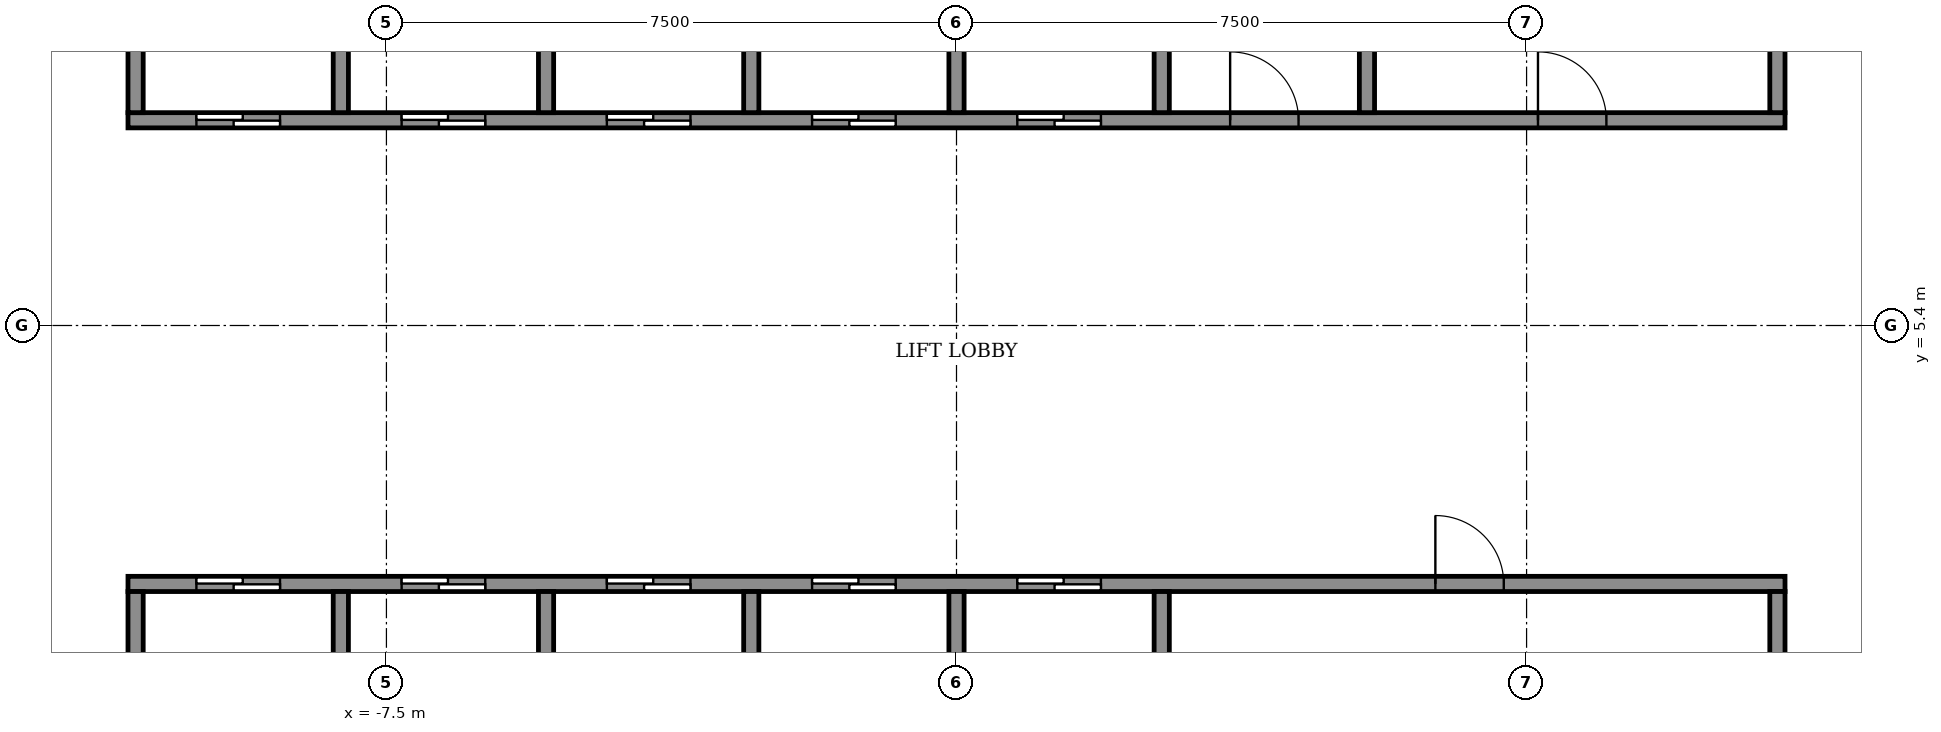
"""IFC4 building model, lengths in metres.
Left out: names, types, materials, properties, quantities, classifications, styles, units other than length and angle.
Written with IfcOpenShell. Run it as: python <this file> out.ifc"""

import sys

from ifc_helpers import new_model, si_unit, direction, frame, frame_2d, origin, place, context, subcontext, project, spatial, rectangle, extrude, element, fill, save


model = new_model("IFC4")
c1 = context("Model", 3, precision=1e-05, world=origin(), true_north=direction((0.0, 1.0)))
c2 = subcontext(c1, "Body", "Model", "MODEL_VIEW")
j1 = project(units=[si_unit("LENGTHUNIT", "METRE"), si_unit("PLANEANGLEUNIT", "RADIAN")], contexts=[c1])
p1 = place(None, origin())
s1 = spatial("IfcSite", under=j1, at=p1, CompositionType="ELEMENT")
p2 = place(p1, origin())
s2 = spatial("IfcBuilding", under=s1, at=p2, CompositionType="ELEMENT")
p3 = place(p2, frame((0.0, 0.0, 109.1)))
s3 = spatial("IfcBuildingStorey", under=s2, at=p3, CompositionType="ELEMENT", Elevation=109.1)
p4 = place(p3, frame((-10.9, 2.0, 0.0), z_axis=(0.0, 0.0, 1.0), x_axis=(1.0, 0.0, 0.0)))
e1 = element("IfcWall", 1, at=p4, inside=s3, PredefinedType="SHEAR", context=c2, shape_type="SweptSolid", body=[
    extrude(rectangle(XDim=21.8, YDim=0.2, at=frame_2d((10.9, 0.0))), origin(), (0.0, 0.0, 1.0), 3.05),
])
p5 = place(p4, frame((0.9, 0.0, 0.0)))
e2 = element("IfcOpeningElement", 2, at=p5, cuts=e1, PredefinedType="OPENING", context=c2, shape_type="SweptSolid", body=[
    extrude(rectangle(XDim=1.1, YDim=2.1, at=frame_2d((0.55, 1.05))), frame((0.0, 0.11, 0.0), z_axis=(0.0, -1.0, 0.0), x_axis=(1.0, 0.0, 0.0)), (0.0, 0.0, 1.0), 0.22),
])
p6 = place(p4, frame((3.6, 0.0, 0.0)))
e3 = element("IfcOpeningElement", 3, at=p6, cuts=e1, PredefinedType="OPENING", context=c2, shape_type="SweptSolid", body=[
    extrude(rectangle(XDim=1.1, YDim=2.1, at=frame_2d((0.55, 1.05))), frame((0.0, 0.11, 0.0), z_axis=(0.0, -1.0, 0.0), x_axis=(1.0, 0.0, 0.0)), (0.0, 0.0, 1.0), 0.22),
])
p7 = place(p4, frame((6.3, 0.0, 0.0)))
e4 = element("IfcOpeningElement", 4, at=p7, cuts=e1, PredefinedType="OPENING", context=c2, shape_type="SweptSolid", body=[
    extrude(rectangle(XDim=1.1, YDim=2.1, at=frame_2d((0.55, 1.05))), frame((0.0, 0.11, 0.0), z_axis=(0.0, -1.0, 0.0), x_axis=(1.0, 0.0, 0.0)), (0.0, 0.0, 1.0), 0.22),
])
p8 = place(p4, frame((9.0, 0.0, 0.0)))
e5 = element("IfcOpeningElement", 5, at=p8, cuts=e1, PredefinedType="OPENING", context=c2, shape_type="SweptSolid", body=[
    extrude(rectangle(XDim=1.1, YDim=2.1, at=frame_2d((0.55, 1.05))), frame((0.0, 0.11, 0.0), z_axis=(0.0, -1.0, 0.0), x_axis=(1.0, 0.0, 0.0)), (0.0, 0.0, 1.0), 0.22),
])
p9 = place(p4, frame((11.7, 0.0, 0.0)))
e6 = element("IfcOpeningElement", 6, at=p9, cuts=e1, PredefinedType="OPENING", context=c2, shape_type="SweptSolid", body=[
    extrude(rectangle(XDim=1.1, YDim=2.1, at=frame_2d((0.55, 1.05))), frame((0.0, 0.11, 0.0), z_axis=(0.0, -1.0, 0.0), x_axis=(1.0, 0.0, 0.0)), (0.0, 0.0, 1.0), 0.22),
])
p10 = place(p4, frame((17.2, 0.0, 0.0)))
e7 = element("IfcOpeningElement", 7, at=p10, cuts=e1, PredefinedType="OPENING", context=c2, shape_type="SweptSolid", body=[
    extrude(rectangle(XDim=0.9, YDim=2.1, at=frame_2d((0.45, 1.05))), frame((0.0, 0.11, 0.0), z_axis=(0.0, -1.0, 0.0), x_axis=(1.0, 0.0, 0.0)), (0.0, 0.0, 1.0), 0.22),
])
p11 = place(p3, frame((-10.9, 8.1, 0.0), z_axis=(0.0, 0.0, 1.0), x_axis=(1.0, 0.0, 0.0)))
e8 = element("IfcWall", 8, at=p11, inside=s3, PredefinedType="SHEAR", context=c2, shape_type="SweptSolid", body=[
    extrude(rectangle(XDim=21.8, YDim=0.2, at=frame_2d((10.9, 0.0))), origin(), (0.0, 0.0, 1.0), 3.05),
])
p12 = place(p11, frame((0.9, 0.0, 0.0)))
e9 = element("IfcOpeningElement", 9, at=p12, cuts=e8, PredefinedType="OPENING", context=c2, shape_type="SweptSolid", body=[
    extrude(rectangle(XDim=1.1, YDim=2.1, at=frame_2d((0.55, 1.05))), frame((0.0, 0.11, 0.0), z_axis=(0.0, -1.0, 0.0), x_axis=(1.0, 0.0, 0.0)), (0.0, 0.0, 1.0), 0.22),
])
p13 = place(p11, frame((3.6, 0.0, 0.0)))
e10 = element("IfcOpeningElement", 10, at=p13, cuts=e8, PredefinedType="OPENING", context=c2, shape_type="SweptSolid", body=[
    extrude(rectangle(XDim=1.1, YDim=2.1, at=frame_2d((0.55, 1.05))), frame((0.0, 0.11, 0.0), z_axis=(0.0, -1.0, 0.0), x_axis=(1.0, 0.0, 0.0)), (0.0, 0.0, 1.0), 0.22),
])
p14 = place(p11, frame((6.3, 0.0, 0.0)))
e11 = element("IfcOpeningElement", 11, at=p14, cuts=e8, PredefinedType="OPENING", context=c2, shape_type="SweptSolid", body=[
    extrude(rectangle(XDim=1.1, YDim=2.1, at=frame_2d((0.55, 1.05))), frame((0.0, 0.11, 0.0), z_axis=(0.0, -1.0, 0.0), x_axis=(1.0, 0.0, 0.0)), (0.0, 0.0, 1.0), 0.22),
])
p15 = place(p11, frame((9.0, 0.0, 0.0)))
e12 = element("IfcOpeningElement", 12, at=p15, cuts=e8, PredefinedType="OPENING", context=c2, shape_type="SweptSolid", body=[
    extrude(rectangle(XDim=1.1, YDim=2.1, at=frame_2d((0.55, 1.05))), frame((0.0, 0.11, 0.0), z_axis=(0.0, -1.0, 0.0), x_axis=(1.0, 0.0, 0.0)), (0.0, 0.0, 1.0), 0.22),
])
p16 = place(p11, frame((11.7, 0.0, 0.0)))
e13 = element("IfcOpeningElement", 13, at=p16, cuts=e8, PredefinedType="OPENING", context=c2, shape_type="SweptSolid", body=[
    extrude(rectangle(XDim=1.1, YDim=2.1, at=frame_2d((0.55, 1.05))), frame((0.0, 0.11, 0.0), z_axis=(0.0, -1.0, 0.0), x_axis=(1.0, 0.0, 0.0)), (0.0, 0.0, 1.0), 0.22),
])
p17 = place(p11, frame((14.5, 0.0, 0.0)))
e14 = element("IfcOpeningElement", 14, at=p17, cuts=e8, PredefinedType="OPENING", context=c2, shape_type="SweptSolid", body=[
    extrude(rectangle(XDim=0.9, YDim=2.1, at=frame_2d((0.45, 1.05))), frame((0.0, 0.11, 0.0), z_axis=(0.0, -1.0, 0.0), x_axis=(1.0, 0.0, 0.0)), (0.0, 0.0, 1.0), 0.22),
])
p18 = place(p11, frame((18.55, 0.0, 0.0)))
e15 = element("IfcOpeningElement", 15, at=p18, cuts=e8, PredefinedType="OPENING", context=c2, shape_type="SweptSolid", body=[
    extrude(rectangle(XDim=0.9, YDim=2.1, at=frame_2d((0.45, 1.05))), frame((0.0, 0.11, 0.0), z_axis=(0.0, -1.0, 0.0), x_axis=(1.0, 0.0, 0.0)), (0.0, 0.0, 1.0), 0.22),
])
for number, where, z_axis, x_axis in (
    (16, (-10.8, -0.6, 0.0), (0.0, 0.0, 1.0), (0.0, 1.0, 0.0)),
    (17, (-8.1, -0.6, 0.0), (0.0, 0.0, 1.0), (0.0, 1.0, 0.0)),
    (18, (-5.4, -0.6, 0.0), (0.0, 0.0, 1.0), (0.0, 1.0, 0.0)),
    (19, (-2.7, -0.6, 0.0), (0.0, 0.0, 1.0), (0.0, 1.0, 0.0)),
    (20, (0.0, -0.6, 0.0), (0.0, 0.0, 1.0), (0.0, 1.0, 0.0)),
    (21, (2.7, -0.6, 0.0), (0.0, 0.0, 1.0), (0.0, 1.0, 0.0)),
):
    element("IfcWall", number, at=place(p3, frame(where, z_axis=z_axis, x_axis=x_axis)), inside=s3, PredefinedType="SHEAR", context=c2, shape_type="SweptSolid", body=[
        extrude(rectangle(XDim=2.5, YDim=0.2, at=frame_2d((1.25, 0.0))), origin(), (0.0, 0.0, 1.0), 3.05),
    ])
p19 = place(p3, frame((10.8, -0.6, 0.0), z_axis=(0.0, 0.0, 1.0), x_axis=(0.0, 1.0, 0.0)))
e22 = element("IfcWall", 22, at=p19, inside=s3, PredefinedType="STANDARD", context=c2, shape_type="SweptSolid", body=[
    extrude(rectangle(XDim=2.5, YDim=0.2, at=frame_2d((1.25, 0.0))), origin(), (0.0, 0.0, 1.0), 3.05),
])
for number, where, z_axis, x_axis in (
    (23, (-10.8, 8.2, 0.0), (0.0, 0.0, 1.0), (0.0, 1.0, 0.0)),
    (24, (-8.1, 8.2, 0.0), (0.0, 0.0, 1.0), (0.0, 1.0, 0.0)),
    (25, (-5.4, 8.2, 0.0), (0.0, 0.0, 1.0), (0.0, 1.0, 0.0)),
    (26, (-2.7, 8.2, 0.0), (0.0, 0.0, 1.0), (0.0, 1.0, 0.0)),
    (27, (0.0, 8.2, 0.0), (0.0, 0.0, 1.0), (0.0, 1.0, 0.0)),
    (28, (2.7, 8.2, 0.0), (0.0, 0.0, 1.0), (0.0, 1.0, 0.0)),
):
    element("IfcWall", number, at=place(p3, frame(where, z_axis=z_axis, x_axis=x_axis)), inside=s3, PredefinedType="SHEAR", context=c2, shape_type="SweptSolid", body=[
        extrude(rectangle(XDim=2.6, YDim=0.2, at=frame_2d((1.3, 0.0))), origin(), (0.0, 0.0, 1.0), 3.05),
    ])
for number, where, z_axis, x_axis in (
    (29, (5.4, 8.2, 0.0), (0.0, 0.0, 1.0), (0.0, 1.0, 0.0)),
    (30, (10.8, 8.2, 0.0), (0.0, 0.0, 1.0), (0.0, 1.0, 0.0)),
):
    element("IfcWall", number, at=place(p3, frame(where, z_axis=z_axis, x_axis=x_axis)), inside=s3, PredefinedType="STANDARD", context=c2, shape_type="SweptSolid", body=[
        extrude(rectangle(XDim=2.6, YDim=0.2, at=frame_2d((1.3, 0.0))), origin(), (0.0, 0.0, 1.0), 3.05),
    ])
p20 = place(p5, origin())
e31 = element("IfcDoor", 31, at=p20, inside=s3, OperationType="SLIDING_TO_LEFT", PredefinedType="DOOR", context=c2, shape_type="SweptSolid", body=[
    extrude(rectangle(XDim=1.1, YDim=2.1, at=frame_2d((0.55, 1.05))), frame((0.0, 0.025, 0.0), z_axis=(0.0, -1.0, 0.0), x_axis=(1.0, 0.0, 0.0)), (0.0, 0.0, 1.0), 0.05),
])
fill(e2, e31)
p21 = place(p6, origin())
e32 = element("IfcDoor", 32, at=p21, inside=s3, OperationType="SLIDING_TO_LEFT", PredefinedType="DOOR", context=c2, shape_type="SweptSolid", body=[
    extrude(rectangle(XDim=1.1, YDim=2.1, at=frame_2d((0.55, 1.05))), frame((0.0, 0.025, 0.0), z_axis=(0.0, -1.0, 0.0), x_axis=(1.0, 0.0, 0.0)), (0.0, 0.0, 1.0), 0.05),
])
fill(e3, e32)
p22 = place(p7, origin())
e33 = element("IfcDoor", 33, at=p22, inside=s3, OperationType="SLIDING_TO_LEFT", PredefinedType="DOOR", context=c2, shape_type="SweptSolid", body=[
    extrude(rectangle(XDim=1.1, YDim=2.1, at=frame_2d((0.55, 1.05))), frame((0.0, 0.025, 0.0), z_axis=(0.0, -1.0, 0.0), x_axis=(1.0, 0.0, 0.0)), (0.0, 0.0, 1.0), 0.05),
])
fill(e4, e33)
p23 = place(p8, origin())
e34 = element("IfcDoor", 34, at=p23, inside=s3, OperationType="SLIDING_TO_LEFT", PredefinedType="DOOR", context=c2, shape_type="SweptSolid", body=[
    extrude(rectangle(XDim=1.1, YDim=2.1, at=frame_2d((0.55, 1.05))), frame((0.0, 0.025, 0.0), z_axis=(0.0, -1.0, 0.0), x_axis=(1.0, 0.0, 0.0)), (0.0, 0.0, 1.0), 0.05),
])
fill(e5, e34)
p24 = place(p9, origin())
e35 = element("IfcDoor", 35, at=p24, inside=s3, OperationType="SLIDING_TO_LEFT", PredefinedType="DOOR", context=c2, shape_type="SweptSolid", body=[
    extrude(rectangle(XDim=1.1, YDim=2.1, at=frame_2d((0.55, 1.05))), frame((0.0, 0.025, 0.0), z_axis=(0.0, -1.0, 0.0), x_axis=(1.0, 0.0, 0.0)), (0.0, 0.0, 1.0), 0.05),
])
fill(e6, e35)
p25 = place(p12, origin())
e36 = element("IfcDoor", 36, at=p25, inside=s3, OperationType="SLIDING_TO_LEFT", PredefinedType="DOOR", context=c2, shape_type="SweptSolid", body=[
    extrude(rectangle(XDim=1.1, YDim=2.1, at=frame_2d((0.55, 1.05))), frame((0.0, 0.025, 0.0), z_axis=(0.0, -1.0, 0.0), x_axis=(1.0, 0.0, 0.0)), (0.0, 0.0, 1.0), 0.05),
])
fill(e9, e36)
p26 = place(p13, origin())
e37 = element("IfcDoor", 37, at=p26, inside=s3, OperationType="SLIDING_TO_LEFT", PredefinedType="DOOR", context=c2, shape_type="SweptSolid", body=[
    extrude(rectangle(XDim=1.1, YDim=2.1, at=frame_2d((0.55, 1.05))), frame((0.0, 0.025, 0.0), z_axis=(0.0, -1.0, 0.0), x_axis=(1.0, 0.0, 0.0)), (0.0, 0.0, 1.0), 0.05),
])
fill(e10, e37)
p27 = place(p14, origin())
e38 = element("IfcDoor", 38, at=p27, inside=s3, OperationType="SLIDING_TO_LEFT", PredefinedType="DOOR", context=c2, shape_type="SweptSolid", body=[
    extrude(rectangle(XDim=1.1, YDim=2.1, at=frame_2d((0.55, 1.05))), frame((0.0, 0.025, 0.0), z_axis=(0.0, -1.0, 0.0), x_axis=(1.0, 0.0, 0.0)), (0.0, 0.0, 1.0), 0.05),
])
fill(e11, e38)
p28 = place(p15, origin())
e39 = element("IfcDoor", 39, at=p28, inside=s3, OperationType="SLIDING_TO_LEFT", PredefinedType="DOOR", context=c2, shape_type="SweptSolid", body=[
    extrude(rectangle(XDim=1.1, YDim=2.1, at=frame_2d((0.55, 1.05))), frame((0.0, 0.025, 0.0), z_axis=(0.0, -1.0, 0.0), x_axis=(1.0, 0.0, 0.0)), (0.0, 0.0, 1.0), 0.05),
])
fill(e12, e39)
p29 = place(p16, origin())
e40 = element("IfcDoor", 40, at=p29, inside=s3, OperationType="SLIDING_TO_LEFT", PredefinedType="DOOR", context=c2, shape_type="SweptSolid", body=[
    extrude(rectangle(XDim=1.1, YDim=2.1, at=frame_2d((0.55, 1.05))), frame((0.0, 0.025, 0.0), z_axis=(0.0, -1.0, 0.0), x_axis=(1.0, 0.0, 0.0)), (0.0, 0.0, 1.0), 0.05),
])
fill(e13, e40)
p30 = place(p10, origin())
e41 = element("IfcDoor", 41, at=p30, inside=s3, OperationType="SINGLE_SWING_LEFT", PredefinedType="DOOR", context=c2, shape_type="SweptSolid", body=[
    extrude(rectangle(XDim=0.9, YDim=2.1, at=frame_2d((0.45, 1.05))), frame((0.0, 0.025, 0.0), z_axis=(0.0, -1.0, 0.0), x_axis=(1.0, 0.0, 0.0)), (0.0, 0.0, 1.0), 0.05),
])
fill(e7, e41)
p31 = place(p17, origin())
e42 = element("IfcDoor", 42, at=p31, inside=s3, OperationType="SINGLE_SWING_RIGHT", PredefinedType="DOOR", context=c2, shape_type="SweptSolid", body=[
    extrude(rectangle(XDim=0.9, YDim=2.1, at=frame_2d((0.45, 1.05))), frame((0.0, 0.025, 0.0), z_axis=(0.0, -1.0, 0.0), x_axis=(1.0, 0.0, 0.0)), (0.0, 0.0, 1.0), 0.05),
])
fill(e14, e42)
p32 = place(p18, origin())
e43 = element("IfcDoor", 43, at=p32, inside=s3, OperationType="SINGLE_SWING_LEFT", PredefinedType="DOOR", context=c2, shape_type="SweptSolid", body=[
    extrude(rectangle(XDim=0.9, YDim=2.1, at=frame_2d((0.45, 1.05))), frame((0.0, 0.025, 0.0), z_axis=(0.0, -1.0, 0.0), x_axis=(1.0, 0.0, 0.0)), (0.0, 0.0, 1.0), 0.05),
])
fill(e15, e43)
save(model, sys.argv[1])
